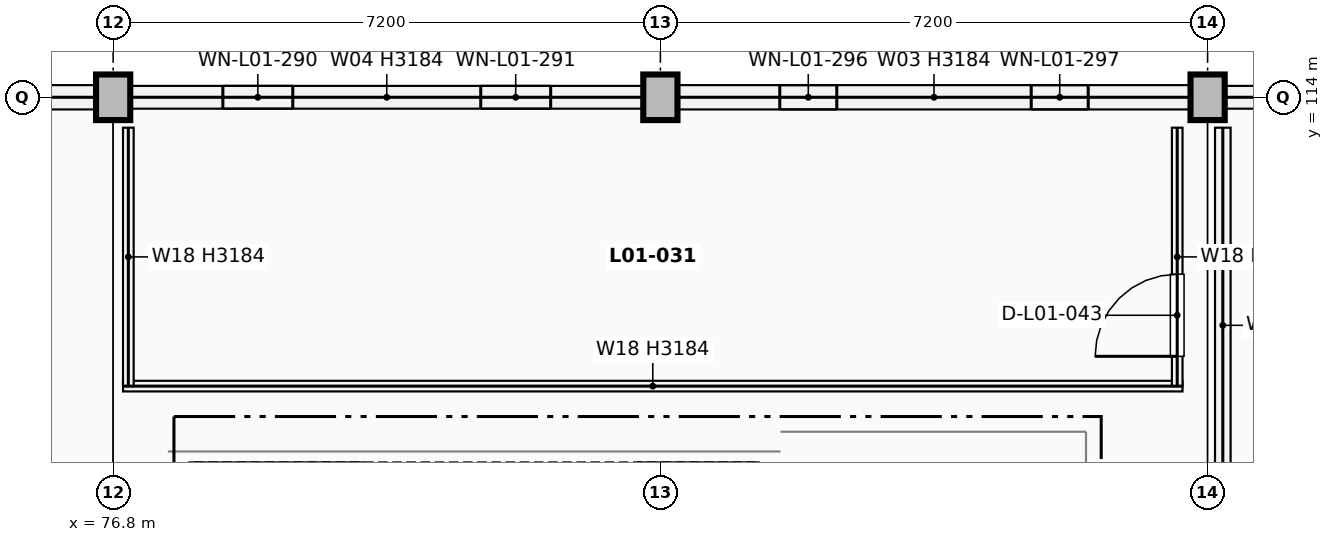
"""IFC4 building model, lengths in metres.
Left out: names, types, materials, properties, quantities, classifications, styles, units other than length and angle.
Written with IfcOpenShell. Run it as: python <this file> out.ifc"""

import sys

from ifc_helpers import new_model, si_unit, direction, frame, frame_2d, origin, origin_2d, place, context, subcontext, project, spatial, rectangle, extrude, element, fill, save


model = new_model("IFC4")
c1 = context("Model", 3, precision=1e-05, world=origin(), true_north=direction((0.0, 1.0)))
c2 = subcontext(c1, "Body", "Model", "MODEL_VIEW")
j1 = project(units=[si_unit("LENGTHUNIT", "METRE"), si_unit("PLANEANGLEUNIT", "RADIAN")], contexts=[c1])
p1 = place(None, origin())
s1 = spatial("IfcSite", under=j1, at=p1, CompositionType="ELEMENT")
p2 = place(p1, origin())
s2 = spatial("IfcBuilding", under=s1, at=p2, CompositionType="ELEMENT")
p3 = place(p2, frame((0.0, 0.0, 5.1)))
s3 = spatial("IfcBuildingStorey", under=s2, at=p3, CompositionType="ELEMENT", Elevation=5.1)
for number, where, z_axis, x_axis in (
    (1, (76.8, 114.0, 0.0), (0.0, 0.0, 1.0), (1.0, 0.0, 0.0)),
    (2, (84.0, 114.0, 0.0), (0.0, 0.0, 1.0), (1.0, 0.0, 0.0)),
    (3, (91.2, 114.0, 0.0), (0.0, 0.0, 1.0), (1.0, 0.0, 0.0)),
):
    element("IfcColumn", number, at=place(p3, frame(where, z_axis=z_axis, x_axis=x_axis)), inside=s3, PredefinedType="COLUMN", context=c2, shape_type="SweptSolid", body=[
        extrude(rectangle(XDim=0.45, YDim=0.6, at=origin_2d()), origin(), (0.0, 0.0, 1.0), 4.42),
    ])
p4 = place(p3, frame((69.827, 114.0, 0.0), z_axis=(0.0, 0.0, 1.0), x_axis=(1.0, 0.0, 0.0)))
e4 = element("IfcWall", 4, at=p4, inside=s3, PredefinedType="SOLIDWALL", context=c2, shape_type="SweptSolid", body=[
    extrude(rectangle(XDim=6.746, YDim=0.32, at=frame_2d((3.373, 0.0))), origin(), (0.0, 0.0, 1.0), 3.184),
])
p5 = place(p4, frame((1.366, 0.0, 0.75)))
e5 = element("IfcOpeningElement", 5, at=p5, cuts=e4, PredefinedType="OPENING", context=c2, shape_type="SweptSolid", body=[
    extrude(rectangle(XDim=0.72, YDim=2.24, at=frame_2d((0.36, 1.12))), frame((0.0, 0.17, 0.0), z_axis=(0.0, -1.0, 0.0), x_axis=(1.0, 0.0, 0.0)), (0.0, 0.0, 1.0), 0.34),
])
p6 = place(p4, frame((4.659, 0.0, 0.75)))
e6 = element("IfcOpeningElement", 6, at=p6, cuts=e4, PredefinedType="OPENING", context=c2, shape_type="SweptSolid", body=[
    extrude(rectangle(XDim=0.72, YDim=2.24, at=frame_2d((0.36, 1.12))), frame((0.0, 0.17, 0.0), z_axis=(0.0, -1.0, 0.0), x_axis=(1.0, 0.0, 0.0)), (0.0, 0.0, 1.0), 0.34),
])
p7 = place(p3, frame((77.027, 114.0, 0.0), z_axis=(0.0, 0.0, 1.0), x_axis=(1.0, 0.0, 0.0)))
e7 = element("IfcWall", 7, at=p7, inside=s3, PredefinedType="SOLIDWALL", context=c2, shape_type="SweptSolid", body=[
    extrude(rectangle(XDim=6.746, YDim=0.3, at=frame_2d((3.373, 0.0))), origin(), (0.0, 0.0, 1.0), 3.184),
])
p8 = place(p7, frame((1.217, 0.0, 0.75)))
e8 = element("IfcOpeningElement", 8, at=p8, cuts=e7, PredefinedType="OPENING", context=c2, shape_type="SweptSolid", body=[
    extrude(rectangle(XDim=0.92, YDim=2.22, at=frame_2d((0.46, 1.11))), frame((0.0, 0.16, 0.0), z_axis=(0.0, -1.0, 0.0), x_axis=(1.0, 0.0, 0.0)), (0.0, 0.0, 1.0), 0.32),
])
p9 = place(p7, frame((4.61, 0.0, 0.75)))
e9 = element("IfcOpeningElement", 9, at=p9, cuts=e7, PredefinedType="OPENING", context=c2, shape_type="SweptSolid", body=[
    extrude(rectangle(XDim=0.92, YDim=2.22, at=frame_2d((0.46, 1.11))), frame((0.0, 0.16, 0.0), z_axis=(0.0, -1.0, 0.0), x_axis=(1.0, 0.0, 0.0)), (0.0, 0.0, 1.0), 0.32),
])
p10 = place(p3, frame((84.227, 114.0, 0.0), z_axis=(0.0, 0.0, 1.0), x_axis=(1.0, 0.0, 0.0)))
e10 = element("IfcWall", 10, at=p10, inside=s3, PredefinedType="SOLIDWALL", context=c2, shape_type="SweptSolid", body=[
    extrude(rectangle(XDim=6.746, YDim=0.32, at=frame_2d((3.373, 0.0))), origin(), (0.0, 0.0, 1.0), 3.184),
])
p11 = place(p10, frame((1.344, 0.0, 0.75)))
e11 = element("IfcOpeningElement", 11, at=p11, cuts=e10, PredefinedType="OPENING", context=c2, shape_type="SweptSolid", body=[
    extrude(rectangle(XDim=0.75, YDim=2.3, at=frame_2d((0.375, 1.15))), frame((0.0, 0.17, 0.0), z_axis=(0.0, -1.0, 0.0), x_axis=(1.0, 0.0, 0.0)), (0.0, 0.0, 1.0), 0.34),
])
p12 = place(p10, frame((4.652, 0.0, 0.75)))
e12 = element("IfcOpeningElement", 12, at=p12, cuts=e10, PredefinedType="OPENING", context=c2, shape_type="SweptSolid", body=[
    extrude(rectangle(XDim=0.75, YDim=2.3, at=frame_2d((0.375, 1.15))), frame((0.0, 0.17, 0.0), z_axis=(0.0, -1.0, 0.0), x_axis=(1.0, 0.0, 0.0)), (0.0, 0.0, 1.0), 0.34),
])
p13 = place(p3, frame((91.427, 114.0, 0.0), z_axis=(0.0, 0.0, 1.0), x_axis=(1.0, 0.0, 0.0)))
e13 = element("IfcWall", 13, at=p13, inside=s3, PredefinedType="SOLIDWALL", context=c2, shape_type="SweptSolid", body=[
    extrude(rectangle(XDim=6.746, YDim=0.3, at=frame_2d((3.373, 0.0))), origin(), (0.0, 0.0, 1.0), 3.184),
])
p14 = place(p13, frame((1.344, 0.0, 0.75)))
e14 = element("IfcOpeningElement", 14, at=p14, cuts=e13, PredefinedType="OPENING", context=c2, shape_type="SweptSolid", body=[
    extrude(rectangle(XDim=0.75, YDim=1.9, at=frame_2d((0.375, 0.95))), frame((0.0, 0.16, 0.0), z_axis=(0.0, -1.0, 0.0), x_axis=(1.0, 0.0, 0.0)), (0.0, 0.0, 1.0), 0.32),
])
p15 = place(p13, frame((4.652, 0.0, 0.75)))
e15 = element("IfcOpeningElement", 15, at=p15, cuts=e13, PredefinedType="OPENING", context=c2, shape_type="SweptSolid", body=[
    extrude(rectangle(XDim=0.75, YDim=1.9, at=frame_2d((0.375, 0.95))), frame((0.0, 0.16, 0.0), z_axis=(0.0, -1.0, 0.0), x_axis=(1.0, 0.0, 0.0)), (0.0, 0.0, 1.0), 0.32),
])
p16 = place(p3, frame((77.52, 109.34, 0.0), z_axis=(0.0, 0.0, 1.0), x_axis=(1.0, 0.0, 0.0)))
e16 = element("IfcWall", 16, at=p16, inside=s3, PredefinedType="SHEAR", context=c2, shape_type="SweptSolid", body=[
    extrude(rectangle(XDim=8.06, YDim=0.28, at=frame_2d((4.03, 0.0))), origin(), (0.0, 0.0, 1.0), 4.42),
])
p17 = place(p3, frame((89.6, 105.1, 0.0), z_axis=(0.0, 0.0, 1.0), x_axis=(0.0, 1.0, 0.0)))
e17 = element("IfcWall", 17, at=p17, inside=s3, PredefinedType="PARTITIONING", context=c2, shape_type="SweptSolid", body=[
    extrude(rectangle(XDim=4.5, YDim=0.2, at=frame_2d((2.25, 0.0))), origin(), (0.0, 0.0, 1.0), 3.694),
])
p18 = place(p17, frame((1.525, 0.0, 0.0)))
e18 = element("IfcOpeningElement", 18, at=p18, cuts=e17, PredefinedType="OPENING", context=c2, shape_type="SweptSolid", body=[
    extrude(rectangle(XDim=1.45, YDim=2.2, at=frame_2d((0.725, 1.1))), frame((0.0, 0.11, 0.0), z_axis=(0.0, -1.0, 0.0), x_axis=(1.0, 0.0, 0.0)), (0.0, 0.0, 1.0), 0.22),
])
p19 = place(p3, frame((85.58, 109.6, 0.0), z_axis=(0.0, 0.0, 1.0), x_axis=(1.0, 0.0, 0.0)))
e19 = element("IfcWall", 19, at=p19, inside=s3, PredefinedType="PARTITIONING", context=c2, shape_type="SweptSolid", body=[
    extrude(rectangle(XDim=4.02, YDim=0.2, at=frame_2d((2.01, 0.0))), origin(), (0.0, 0.0, 1.0), 3.694),
])
p20 = place(p3, frame((76.93, 110.2, 0.0), z_axis=(0.0, 0.0, 1.0), x_axis=(1.0, 0.0, 0.0)))
e20 = element("IfcWall", 20, at=p20, inside=s3, PredefinedType="PARTITIONING", context=c2, shape_type="SweptSolid", body=[
    extrude(rectangle(XDim=13.94, YDim=0.14, at=frame_2d((6.97, 0.0))), origin(), (0.0, 0.0, 1.0), 3.184),
])
p21 = place(p3, frame((77.0, 110.2, 0.0), z_axis=(0.0, 0.0, 1.0), x_axis=(0.0, 1.0, 0.0)))
e21 = element("IfcWall", 21, at=p21, inside=s3, PredefinedType="PARTITIONING", context=c2, shape_type="SweptSolid", body=[
    extrude(rectangle(XDim=3.4, YDim=0.14, at=frame_2d((1.7, 0.0))), origin(), (0.0, 0.0, 1.0), 3.184),
])
p22 = place(p3, frame((90.8, 110.2, 0.0), z_axis=(0.0, 0.0, 1.0), x_axis=(0.0, 1.0, 0.0)))
e22 = element("IfcWall", 22, at=p22, inside=s3, PredefinedType="PARTITIONING", context=c2, shape_type="SweptSolid", body=[
    extrude(rectangle(XDim=3.4, YDim=0.14, at=frame_2d((1.7, 0.0))), origin(), (0.0, 0.0, 1.0), 3.694),
])
p23 = place(p22, frame((0.392, 0.0, 0.0)))
e23 = element("IfcOpeningElement", 23, at=p23, cuts=e22, PredefinedType="OPENING", context=c2, shape_type="SweptSolid", body=[
    extrude(rectangle(XDim=1.08, YDim=2.16, at=frame_2d((0.54, 1.08))), frame((0.0, 0.08, 0.0), z_axis=(0.0, -1.0, 0.0), x_axis=(1.0, 0.0, 0.0)), (0.0, 0.0, 1.0), 0.16),
])
p24 = place(p3, frame((91.4, 108.4, 0.0), z_axis=(0.0, 0.0, 1.0), x_axis=(0.0, 1.0, 0.0)))
e24 = element("IfcWall", 24, at=p24, inside=s3, PredefinedType="PARTITIONING", context=c2, shape_type="SweptSolid", body=[
    extrude(rectangle(XDim=5.2, YDim=0.205, at=frame_2d((2.6, 0.0))), origin(), (0.0, 0.0, 1.0), 3.184),
])
p25 = place(p8, origin())
e25 = element("IfcWindow", 25, at=p25, inside=s3, PartitioningType="SINGLE_PANEL", PredefinedType="WINDOW", context=c2, shape_type="SweptSolid", body=[
    extrude(rectangle(XDim=0.92, YDim=2.22, at=frame_2d((0.46, 1.11))), frame((0.0, 0.03, 0.0), z_axis=(0.0, -1.0, 0.0), x_axis=(1.0, 0.0, 0.0)), (0.0, 0.0, 1.0), 0.06),
])
fill(e8, e25)
p26 = place(p9, origin())
e26 = element("IfcWindow", 26, at=p26, inside=s3, PartitioningType="SINGLE_PANEL", PredefinedType="WINDOW", context=c2, shape_type="SweptSolid", body=[
    extrude(rectangle(XDim=0.92, YDim=2.22, at=frame_2d((0.46, 1.11))), frame((0.0, 0.03, 0.0), z_axis=(0.0, -1.0, 0.0), x_axis=(1.0, 0.0, 0.0)), (0.0, 0.0, 1.0), 0.06),
])
fill(e9, e26)
p27 = place(p11, origin())
e27 = element("IfcWindow", 27, at=p27, inside=s3, PartitioningType="SINGLE_PANEL", PredefinedType="WINDOW", context=c2, shape_type="SweptSolid", body=[
    extrude(rectangle(XDim=0.75, YDim=2.3, at=frame_2d((0.375, 1.15))), frame((0.0, 0.03, 0.0), z_axis=(0.0, -1.0, 0.0), x_axis=(1.0, 0.0, 0.0)), (0.0, 0.0, 1.0), 0.06),
])
fill(e11, e27)
p28 = place(p12, origin())
e28 = element("IfcWindow", 28, at=p28, inside=s3, PartitioningType="SINGLE_PANEL", PredefinedType="WINDOW", context=c2, shape_type="SweptSolid", body=[
    extrude(rectangle(XDim=0.75, YDim=2.3, at=frame_2d((0.375, 1.15))), frame((0.0, 0.03, 0.0), z_axis=(0.0, -1.0, 0.0), x_axis=(1.0, 0.0, 0.0)), (0.0, 0.0, 1.0), 0.06),
])
fill(e12, e28)
p29 = place(p23, origin())
e29 = element("IfcDoor", 29, at=p29, inside=s3, OperationType="SINGLE_SWING_LEFT", PredefinedType="DOOR", context=c2, shape_type="SweptSolid", body=[
    extrude(rectangle(XDim=1.08, YDim=2.16, at=frame_2d((0.54, 1.08))), frame((0.0, 0.025, 0.0), z_axis=(0.0, -1.0, 0.0), x_axis=(1.0, 0.0, 0.0)), (0.0, 0.0, 1.0), 0.05),
])
fill(e23, e29)
save(model, sys.argv[1])
